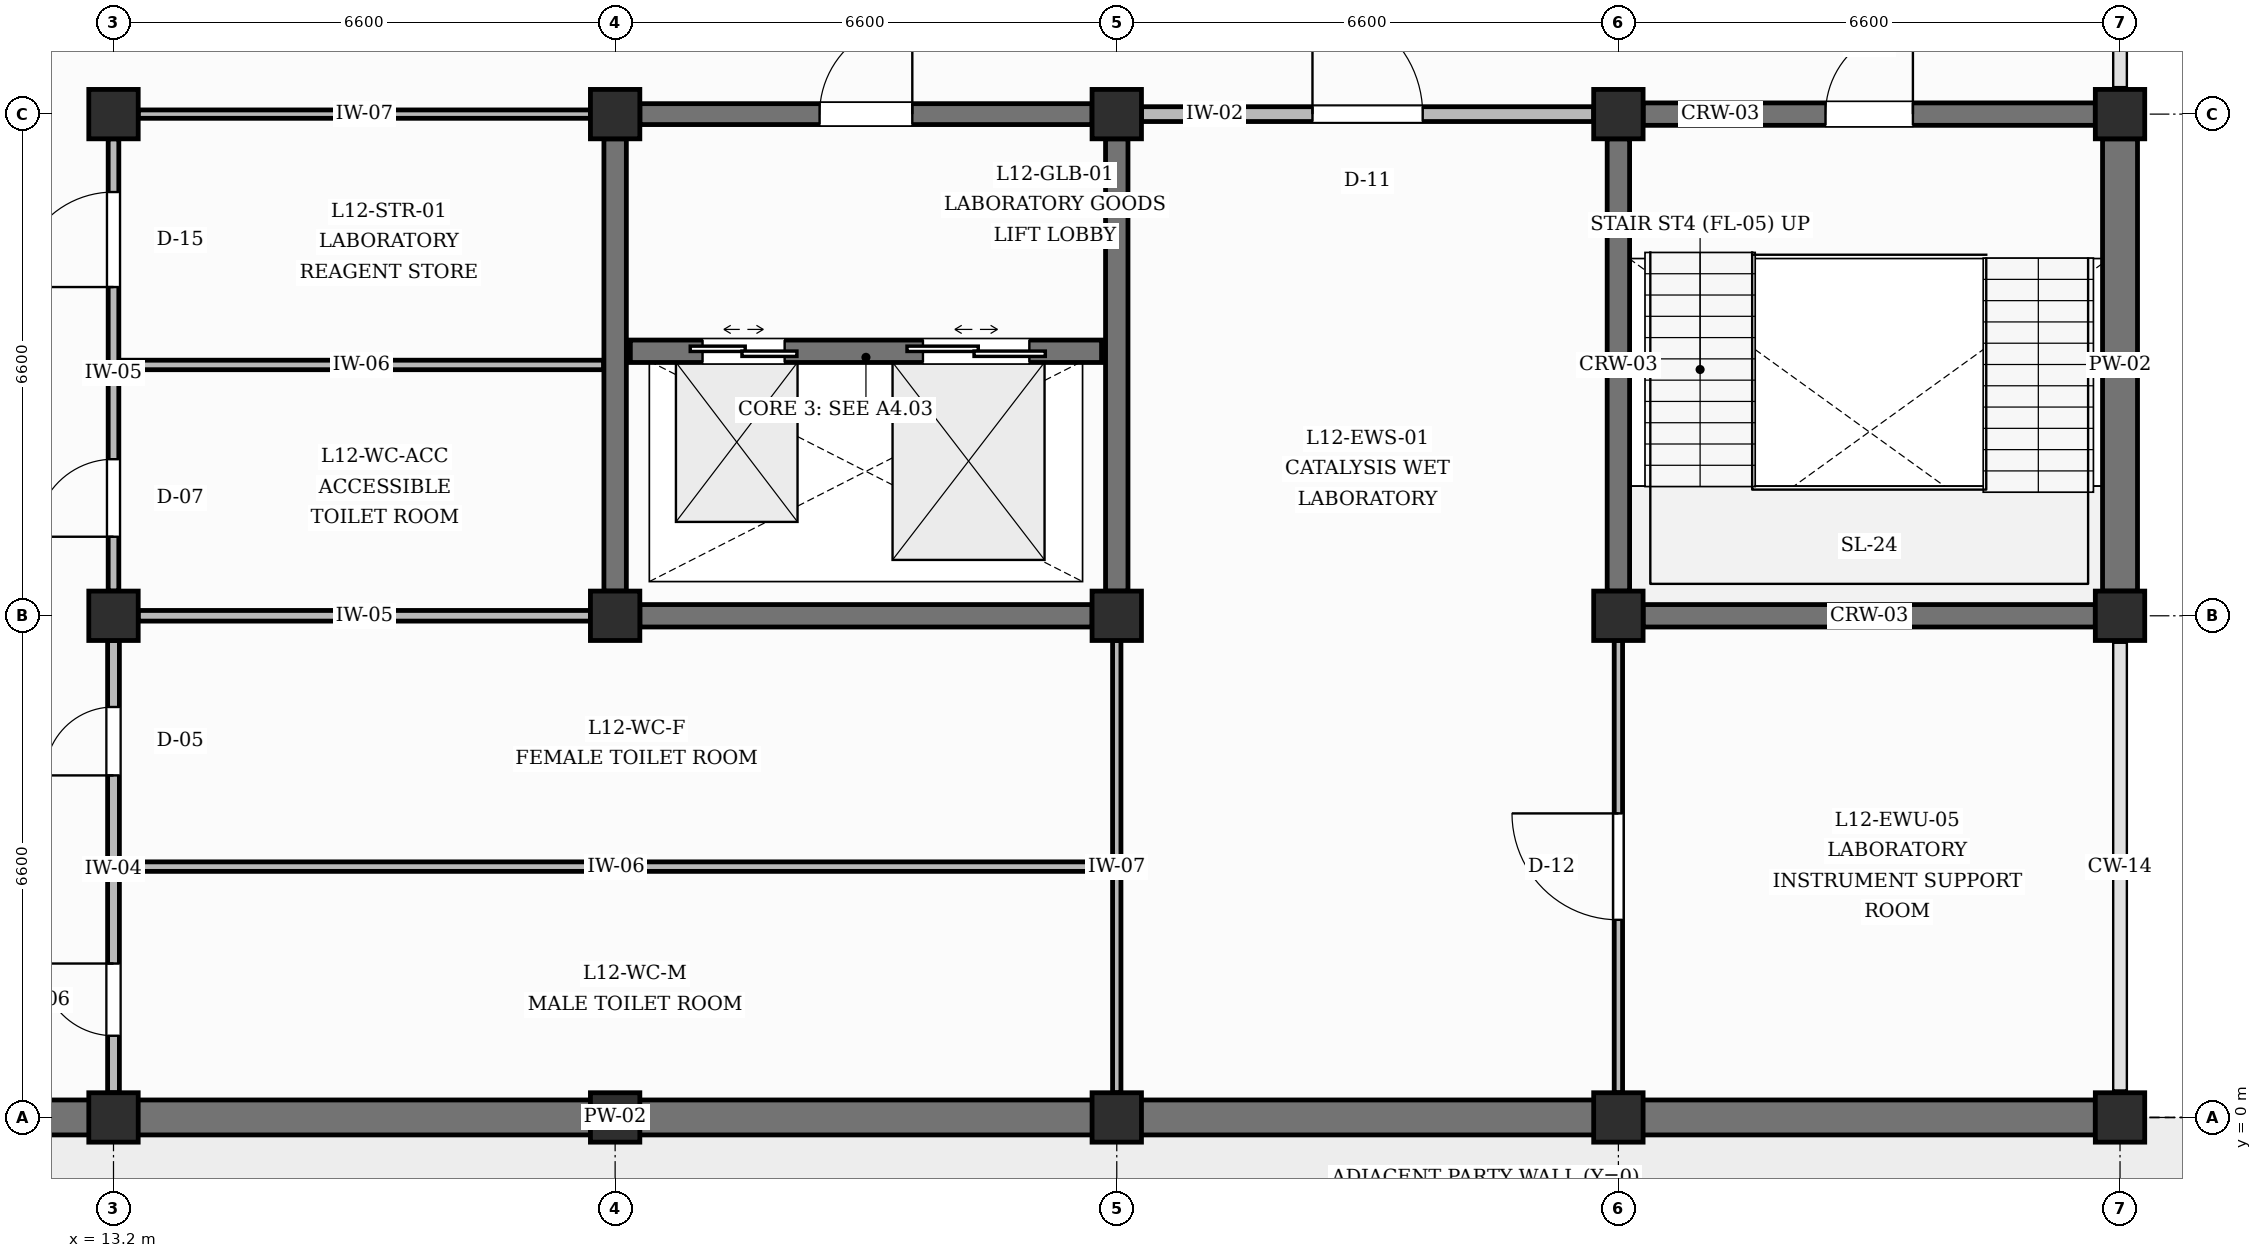
"""IFC4 building model, lengths in metres.
Left out: names, types, materials, properties, quantities, classifications, styles, units other than length and angle.
Written with IfcOpenShell. Run it as: python <this file> out.ifc"""

import sys

from ifc_helpers import new_model, si_unit, direction, frame, frame_2d, origin, origin_2d, place, context, subcontext, project, spatial, rectangle, extrude, element, fill, save


model = new_model("IFC4")
c1 = context("Model", 3, precision=1e-05, world=origin(), true_north=direction((0.0, 1.0)))
c2 = subcontext(c1, "Body", "Model", "MODEL_VIEW")
j1 = project(units=[si_unit("LENGTHUNIT", "METRE"), si_unit("PLANEANGLEUNIT", "RADIAN")], contexts=[c1])
p1 = place(None, origin())
s1 = spatial("IfcSite", under=j1, at=p1, CompositionType="ELEMENT")
p2 = place(p1, origin())
s2 = spatial("IfcBuilding", under=s1, at=p2, CompositionType="ELEMENT")
p3 = place(p2, frame((0.0, 0.0, 52.2)))
s3 = spatial("IfcBuildingStorey", under=s2, at=p3, CompositionType="ELEMENT", Elevation=52.2)
for number, where, z_axis, x_axis in (
    (1, (13.2, 0.0, 0.0), (0.0, 0.0, 1.0), (1.0, 0.0, 0.0)),
    (2, (13.2, 6.6, 0.0), (0.0, 0.0, 1.0), (1.0, 0.0, 0.0)),
    (3, (13.2, 13.2, 0.0), (0.0, 0.0, 1.0), (1.0, 0.0, 0.0)),
    (4, (19.8, 0.0, 0.0), (0.0, 0.0, 1.0), (1.0, 0.0, 0.0)),
    (5, (19.8, 6.6, 0.0), (0.0, 0.0, 1.0), (1.0, 0.0, 0.0)),
    (6, (19.8, 13.2, 0.0), (0.0, 0.0, 1.0), (1.0, 0.0, 0.0)),
    (7, (26.4, 0.0, 0.0), (0.0, 0.0, 1.0), (1.0, 0.0, 0.0)),
    (8, (26.4, 6.6, 0.0), (0.0, 0.0, 1.0), (1.0, 0.0, 0.0)),
    (9, (26.4, 13.2, 0.0), (0.0, 0.0, 1.0), (1.0, 0.0, 0.0)),
    (10, (33.0, 0.0, 0.0), (0.0, 0.0, 1.0), (1.0, 0.0, 0.0)),
    (11, (33.0, 6.6, 0.0), (0.0, 0.0, 1.0), (1.0, 0.0, 0.0)),
    (12, (33.0, 13.2, 0.0), (0.0, 0.0, 1.0), (1.0, 0.0, 0.0)),
    (13, (39.6, 0.0, 0.0), (0.0, 0.0, 1.0), (1.0, 0.0, 0.0)),
    (14, (39.6, 6.6, 0.0), (0.0, 0.0, 1.0), (1.0, 0.0, 0.0)),
    (15, (39.6, 13.2, 0.0), (0.0, 0.0, 1.0), (1.0, 0.0, 0.0)),
):
    element("IfcColumn", number, at=place(p3, frame(where, z_axis=z_axis, x_axis=x_axis)), inside=s3, PredefinedType="COLUMN", context=c2, shape_type="SweptSolid", body=[
        extrude(rectangle(XDim=0.65, YDim=0.65, at=origin_2d()), origin(), (0.0, 0.0, 1.0), 4.2),
    ])
p4 = place(p3, frame((6.925, 0.0, 0.0), z_axis=(0.0, 0.0, 1.0), x_axis=(1.0, 0.0, 0.0)))
e16 = element("IfcWall", 16, at=p4, inside=s3, PredefinedType="SOLIDWALL", context=c2, shape_type="SweptSolid", body=[
    extrude(rectangle(XDim=5.95, YDim=0.46, at=frame_2d((2.975, 0.0))), origin(), (0.0, 0.0, 1.0), 3.3),
])
p5 = place(p3, frame((13.525, 0.0, 0.0), z_axis=(0.0, 0.0, 1.0), x_axis=(1.0, 0.0, 0.0)))
e17 = element("IfcWall", 17, at=p5, inside=s3, PredefinedType="SOLIDWALL", context=c2, shape_type="SweptSolid", body=[
    extrude(rectangle(XDim=5.95, YDim=0.46, at=frame_2d((2.975, 0.0))), origin(), (0.0, 0.0, 1.0), 3.3),
])
for number, where, z_axis, x_axis in (
    (18, (20.125, 0.0, 0.0), (0.0, 0.0, 1.0), (1.0, 0.0, 0.0)),
    (19, (26.725, 0.0, 0.0), (0.0, 0.0, 1.0), (1.0, 0.0, 0.0)),
    (20, (33.325, 0.0, 0.0), (0.0, 0.0, 1.0), (1.0, 0.0, 0.0)),
    (21, (39.6, 6.925, 0.0), (0.0, 0.0, 1.0), (0.0, 1.0, 0.0)),
):
    element("IfcWall", number, at=place(p3, frame(where, z_axis=z_axis, x_axis=x_axis)), inside=s3, PredefinedType="SOLIDWALL", context=c2, shape_type="SweptSolid", body=[
        extrude(rectangle(XDim=5.95, YDim=0.46, at=frame_2d((2.975, 0.0))), origin(), (0.0, 0.0, 1.0), 3.3),
    ])
p6 = place(p3, frame((33.325, 6.6, 0.0), z_axis=(0.0, 0.0, 1.0), x_axis=(1.0, 0.0, 0.0)))
e22 = element("IfcWall", 22, at=p6, inside=s3, PredefinedType="SHEAR", context=c2, shape_type="SweptSolid", body=[
    extrude(rectangle(XDim=5.95, YDim=0.295, at=frame_2d((2.975, 0.0))), origin(), (0.0, 0.0, 1.0), 3.3),
])
p7 = place(p3, frame((33.325, 13.2, 0.0), z_axis=(0.0, 0.0, 1.0), x_axis=(1.0, 0.0, 0.0)))
e23 = element("IfcWall", 23, at=p7, inside=s3, PredefinedType="SHEAR", context=c2, shape_type="SweptSolid", body=[
    extrude(rectangle(XDim=5.95, YDim=0.295, at=frame_2d((2.975, 0.0))), origin(), (0.0, 0.0, 1.0), 3.3),
])
p8 = place(p7, frame((2.4, 0.0, 0.0)))
e24 = element("IfcOpeningElement", 24, at=p8, cuts=e23, PredefinedType="OPENING", context=c2, shape_type="SweptSolid", body=[
    extrude(rectangle(XDim=1.15, YDim=2.2, at=frame_2d((0.575, 1.1))), frame((0.0, 0.157, 0.0), z_axis=(0.0, -1.0, 0.0), x_axis=(1.0, 0.0, 0.0)), (0.0, 0.0, 1.0), 0.315),
])
for number, where, z_axis, x_axis in (
    (25, (33.0, 6.925, 0.0), (0.0, 0.0, 1.0), (0.0, 1.0, 0.0)),
    (26, (20.125, 6.6, 0.0), (0.0, 0.0, 1.0), (1.0, 0.0, 0.0)),
    (27, (19.8, 6.925, 0.0), (0.0, 0.0, 1.0), (0.0, 1.0, 0.0)),
    (28, (26.4, 6.925, 0.0), (0.0, 0.0, 1.0), (0.0, 1.0, 0.0)),
):
    element("IfcWall", number, at=place(p3, frame(where, z_axis=z_axis, x_axis=x_axis)), inside=s3, PredefinedType="SHEAR", context=c2, shape_type="SweptSolid", body=[
        extrude(rectangle(XDim=5.95, YDim=0.295, at=frame_2d((2.975, 0.0))), origin(), (0.0, 0.0, 1.0), 3.3),
    ])
p9 = place(p3, frame((20.125, 13.2, 0.0), z_axis=(0.0, 0.0, 1.0), x_axis=(1.0, 0.0, 0.0)))
e29 = element("IfcWall", 29, at=p9, inside=s3, PredefinedType="SHEAR", context=c2, shape_type="SweptSolid", body=[
    extrude(rectangle(XDim=5.95, YDim=0.275, at=frame_2d((2.975, 0.0))), origin(), (0.0, 0.0, 1.0), 3.3),
])
p10 = place(p9, frame((2.365, 0.0, 0.0)))
e30 = element("IfcOpeningElement", 30, at=p10, cuts=e29, PredefinedType="OPENING", context=c2, shape_type="SweptSolid", body=[
    extrude(rectangle(XDim=1.22, YDim=2.15, at=frame_2d((0.61, 1.075))), frame((0.0, 0.147, 0.0), z_axis=(0.0, -1.0, 0.0), x_axis=(1.0, 0.0, 0.0)), (0.0, 0.0, 1.0), 0.295),
])
p11 = place(p3, frame((20.0, 10.08, 0.0), z_axis=(0.0, 0.0, 1.0), x_axis=(1.0, 0.0, 0.0)))
e31 = element("IfcWall", 31, at=p11, inside=s3, PredefinedType="SHEAR", context=c2, shape_type="SweptSolid", body=[
    extrude(rectangle(XDim=6.2, YDim=0.295, at=frame_2d((3.1, 0.0))), origin(), (0.0, 0.0, 1.0), 3.9),
])
p12 = place(p11, frame((0.95, 0.0, 0.0)))
e32 = element("IfcOpeningElement", 32, at=p12, cuts=e31, PredefinedType="OPENING", context=c2, shape_type="SweptSolid", body=[
    extrude(rectangle(XDim=1.08, YDim=2.15, at=frame_2d((0.54, 1.075))), frame((0.0, 0.157, 0.0), z_axis=(0.0, -1.0, 0.0), x_axis=(1.0, 0.0, 0.0)), (0.0, 0.0, 1.0), 0.315),
])
p13 = place(p11, frame((3.85, 0.0, 0.0)))
e33 = element("IfcOpeningElement", 33, at=p13, cuts=e31, PredefinedType="OPENING", context=c2, shape_type="SweptSolid", body=[
    extrude(rectangle(XDim=1.4, YDim=2.35, at=frame_2d((0.7, 1.175))), frame((0.0, 0.157, 0.0), z_axis=(0.0, -1.0, 0.0), x_axis=(1.0, 0.0, 0.0)), (0.0, 0.0, 1.0), 0.315),
])
p14 = place(p3, frame((13.2, 0.325, 0.0), z_axis=(0.0, 0.0, 1.0), x_axis=(0.0, 1.0, 0.0)))
e34 = element("IfcWall", 34, at=p14, inside=s3, PredefinedType="PARTITIONING", context=c2, shape_type="SweptSolid", body=[
    extrude(rectangle(XDim=5.95, YDim=0.155, at=frame_2d((2.975, 0.0))), origin(), (0.0, 0.0, 1.0), 3.3),
])
p15 = place(p14, frame((0.75, 0.0, 0.0)))
e35 = element("IfcOpeningElement", 35, at=p15, cuts=e34, PredefinedType="OPENING", context=c2, shape_type="SweptSolid", body=[
    extrude(rectangle(XDim=0.95, YDim=2.1, at=frame_2d((0.475, 1.05))), frame((0.0, 0.087, 0.0), z_axis=(0.0, -1.0, 0.0), x_axis=(1.0, 0.0, 0.0)), (0.0, 0.0, 1.0), 0.175),
])
p16 = place(p14, frame((4.175, 0.0, 0.0)))
e36 = element("IfcOpeningElement", 36, at=p16, cuts=e34, PredefinedType="OPENING", context=c2, shape_type="SweptSolid", body=[
    extrude(rectangle(XDim=0.9, YDim=2.1, at=frame_2d((0.45, 1.05))), frame((0.0, 0.087, 0.0), z_axis=(0.0, -1.0, 0.0), x_axis=(1.0, 0.0, 0.0)), (0.0, 0.0, 1.0), 0.175),
])
p17 = place(p3, frame((26.4, 0.325, 0.0), z_axis=(0.0, 0.0, 1.0), x_axis=(0.0, 1.0, 0.0)))
e37 = element("IfcWall", 37, at=p17, inside=s3, PredefinedType="PARTITIONING", context=c2, shape_type="SweptSolid", body=[
    extrude(rectangle(XDim=5.95, YDim=0.11, at=frame_2d((2.975, 0.0))), origin(), (0.0, 0.0, 1.0), 3.3),
])
p18 = place(p3, frame((13.525, 6.6, 0.0), z_axis=(0.0, 0.0, 1.0), x_axis=(1.0, 0.0, 0.0)))
e38 = element("IfcWall", 38, at=p18, inside=s3, PredefinedType="PARTITIONING", context=c2, shape_type="SweptSolid", body=[
    extrude(rectangle(XDim=5.95, YDim=0.14, at=frame_2d((2.975, 0.0))), origin(), (0.0, 0.0, 1.0), 3.3),
])
p19 = place(p3, frame((13.2, 6.925, 0.0), z_axis=(0.0, 0.0, 1.0), x_axis=(0.0, 1.0, 0.0)))
e39 = element("IfcWall", 39, at=p19, inside=s3, PredefinedType="PARTITIONING", context=c2, shape_type="SweptSolid", body=[
    extrude(rectangle(XDim=5.95, YDim=0.14, at=frame_2d((2.975, 0.0))), origin(), (0.0, 0.0, 1.0), 3.3),
])
p20 = place(p19, frame((0.715, 0.0, 0.0)))
e40 = element("IfcOpeningElement", 40, at=p20, cuts=e39, PredefinedType="OPENING", context=c2, shape_type="SweptSolid", body=[
    extrude(rectangle(XDim=1.02, YDim=2.15, at=frame_2d((0.51, 1.075))), frame((0.0, 0.08, 0.0), z_axis=(0.0, -1.0, 0.0), x_axis=(1.0, 0.0, 0.0)), (0.0, 0.0, 1.0), 0.16),
])
p21 = place(p19, frame((4.0, 0.0, 0.0)))
e41 = element("IfcOpeningElement", 41, at=p21, cuts=e39, PredefinedType="OPENING", context=c2, shape_type="SweptSolid", body=[
    extrude(rectangle(XDim=1.25, YDim=2.25, at=frame_2d((0.625, 1.125))), frame((0.0, 0.08, 0.0), z_axis=(0.0, -1.0, 0.0), x_axis=(1.0, 0.0, 0.0)), (0.0, 0.0, 1.0), 0.16),
])
p22 = place(p3, frame((13.525, 13.2, 0.0), z_axis=(0.0, 0.0, 1.0), x_axis=(1.0, 0.0, 0.0)))
e42 = element("IfcWall", 42, at=p22, inside=s3, PredefinedType="PARTITIONING", context=c2, shape_type="SweptSolid", body=[
    extrude(rectangle(XDim=5.95, YDim=0.11, at=frame_2d((2.975, 0.0))), origin(), (0.0, 0.0, 1.0), 3.3),
])
p23 = place(p3, frame((33.0, 0.325, 0.0), z_axis=(0.0, 0.0, 1.0), x_axis=(0.0, 1.0, 0.0)))
e43 = element("IfcWall", 43, at=p23, inside=s3, PredefinedType="PARTITIONING", context=c2, shape_type="SweptSolid", body=[
    extrude(rectangle(XDim=5.95, YDim=0.11, at=frame_2d((2.975, 0.0))), origin(), (0.0, 0.0, 1.0), 3.3),
])
p24 = place(p23, frame((2.275, 0.0, 0.0)))
e44 = element("IfcOpeningElement", 44, at=p24, cuts=e43, PredefinedType="OPENING", context=c2, shape_type="SweptSolid", body=[
    extrude(rectangle(XDim=1.4, YDim=2.25, at=frame_2d((0.7, 1.125))), frame((0.0, 0.065, 0.0), z_axis=(0.0, -1.0, 0.0), x_axis=(1.0, 0.0, 0.0)), (0.0, 0.0, 1.0), 0.13),
])
p25 = place(p3, frame((26.725, 13.2, 0.0), z_axis=(0.0, 0.0, 1.0), x_axis=(1.0, 0.0, 0.0)))
e45 = element("IfcWall", 45, at=p25, inside=s3, PredefinedType="PARTITIONING", context=c2, shape_type="SweptSolid", body=[
    extrude(rectangle(XDim=5.95, YDim=0.195, at=frame_2d((2.975, 0.0))), origin(), (0.0, 0.0, 1.0), 3.3),
])
p26 = place(p25, frame((2.25, 0.0, 0.0)))
e46 = element("IfcOpeningElement", 46, at=p26, cuts=e45, PredefinedType="OPENING", context=c2, shape_type="SweptSolid", body=[
    extrude(rectangle(XDim=1.45, YDim=2.25, at=frame_2d((0.725, 1.125))), frame((0.0, 0.107, 0.0), z_axis=(0.0, -1.0, 0.0), x_axis=(1.0, 0.0, 0.0)), (0.0, 0.0, 1.0), 0.215),
])
p27 = place(p3, frame((13.282, 3.3, 0.0), z_axis=(0.0, 0.0, 1.0), x_axis=(1.0, 0.0, 0.0)))
e47 = element("IfcWall", 47, at=p27, inside=s3, PredefinedType="PARTITIONING", context=c2, shape_type="SweptSolid", body=[
    extrude(rectangle(XDim=13.058, YDim=0.125, at=frame_2d((6.529, 0.0))), origin(), (0.0, 0.0, 1.0), 3.9),
])
p28 = place(p3, frame((13.275, 9.9, 0.0), z_axis=(0.0, 0.0, 1.0), x_axis=(1.0, 0.0, 0.0)))
e48 = element("IfcWall", 48, at=p28, inside=s3, PredefinedType="PARTITIONING", context=c2, shape_type="SweptSolid", body=[
    extrude(rectangle(XDim=6.373, YDim=0.125, at=frame_2d((3.186, 0.0))), origin(), (0.0, 0.0, 1.0), 3.9),
])
p29 = place(p8, origin())
e49 = element("IfcDoor", 49, at=p29, inside=s3, OperationType="SINGLE_SWING_RIGHT", PredefinedType="DOOR", context=c2, shape_type="SweptSolid", body=[
    extrude(rectangle(XDim=1.15, YDim=2.2, at=frame_2d((0.575, 1.1))), frame((0.0, 0.025, 0.0), z_axis=(0.0, -1.0, 0.0), x_axis=(1.0, 0.0, 0.0)), (0.0, 0.0, 1.0), 0.05),
])
fill(e24, e49)
p30 = place(p12, origin())
e50 = element("IfcDoor", 50, at=p30, inside=s3, OperationType="DOUBLE_DOOR_SLIDING", PredefinedType="USERDEFINED", context=c2, shape_type="SweptSolid", body=[
    extrude(rectangle(XDim=1.08, YDim=2.15, at=frame_2d((0.54, 1.075))), frame((0.0, 0.025, 0.0), z_axis=(0.0, -1.0, 0.0), x_axis=(1.0, 0.0, 0.0)), (0.0, 0.0, 1.0), 0.05),
])
fill(e32, e50)
p31 = place(p13, origin())
e51 = element("IfcDoor", 51, at=p31, inside=s3, OperationType="DOUBLE_DOOR_SLIDING", PredefinedType="USERDEFINED", context=c2, shape_type="SweptSolid", body=[
    extrude(rectangle(XDim=1.4, YDim=2.35, at=frame_2d((0.7, 1.175))), frame((0.0, 0.025, 0.0), z_axis=(0.0, -1.0, 0.0), x_axis=(1.0, 0.0, 0.0)), (0.0, 0.0, 1.0), 0.05),
])
fill(e33, e51)
p32 = place(p10, origin())
e52 = element("IfcDoor", 52, at=p32, inside=s3, OperationType="SINGLE_SWING_RIGHT", PredefinedType="DOOR", context=c2, shape_type="SweptSolid", body=[
    extrude(rectangle(XDim=1.22, YDim=2.15, at=frame_2d((0.61, 1.075))), frame((0.0, 0.025, 0.0), z_axis=(0.0, -1.0, 0.0), x_axis=(1.0, 0.0, 0.0)), (0.0, 0.0, 1.0), 0.05),
])
fill(e30, e52)
p33 = place(p15, origin())
e53 = element("IfcDoor", 53, at=p33, inside=s3, OperationType="SINGLE_SWING_RIGHT", PredefinedType="DOOR", context=c2, shape_type="SweptSolid", body=[
    extrude(rectangle(XDim=0.95, YDim=2.1, at=frame_2d((0.475, 1.05))), frame((0.0, 0.025, 0.0), z_axis=(0.0, -1.0, 0.0), x_axis=(1.0, 0.0, 0.0)), (0.0, 0.0, 1.0), 0.05),
])
fill(e35, e53)
p34 = place(p16, origin())
e54 = element("IfcDoor", 54, at=p34, inside=s3, OperationType="SINGLE_SWING_LEFT", PredefinedType="DOOR", context=c2, shape_type="SweptSolid", body=[
    extrude(rectangle(XDim=0.9, YDim=2.1, at=frame_2d((0.45, 1.05))), frame((0.0, 0.025, 0.0), z_axis=(0.0, -1.0, 0.0), x_axis=(1.0, 0.0, 0.0)), (0.0, 0.0, 1.0), 0.05),
])
fill(e36, e54)
p35 = place(p20, origin())
e55 = element("IfcDoor", 55, at=p35, inside=s3, OperationType="SINGLE_SWING_LEFT", PredefinedType="DOOR", context=c2, shape_type="SweptSolid", body=[
    extrude(rectangle(XDim=1.02, YDim=2.15, at=frame_2d((0.51, 1.075))), frame((0.0, 0.025, 0.0), z_axis=(0.0, -1.0, 0.0), x_axis=(1.0, 0.0, 0.0)), (0.0, 0.0, 1.0), 0.05),
])
fill(e40, e55)
p36 = place(p21, origin())
e56 = element("IfcDoor", 56, at=p36, inside=s3, OperationType="SINGLE_SWING_LEFT", PredefinedType="DOOR", context=c2, shape_type="SweptSolid", body=[
    extrude(rectangle(XDim=1.25, YDim=2.25, at=frame_2d((0.625, 1.125))), frame((0.0, 0.025, 0.0), z_axis=(0.0, -1.0, 0.0), x_axis=(1.0, 0.0, 0.0)), (0.0, 0.0, 1.0), 0.05),
])
fill(e41, e56)
p37 = place(p26, origin())
e57 = element("IfcDoor", 57, at=p37, inside=s3, OperationType="SINGLE_SWING_LEFT", PredefinedType="DOOR", context=c2, shape_type="SweptSolid", body=[
    extrude(rectangle(XDim=1.45, YDim=2.25, at=frame_2d((0.725, 1.125))), frame((0.0, 0.025, 0.0), z_axis=(0.0, -1.0, 0.0), x_axis=(1.0, 0.0, 0.0)), (0.0, 0.0, 1.0), 0.05),
])
fill(e46, e57)
p38 = place(p24, origin())
e58 = element("IfcDoor", 58, at=p38, inside=s3, OperationType="SINGLE_SWING_RIGHT", PredefinedType="DOOR", context=c2, shape_type="SweptSolid", body=[
    extrude(rectangle(XDim=1.4, YDim=2.25, at=frame_2d((0.7, 1.125))), frame((0.0, 0.025, 0.0), z_axis=(0.0, -1.0, 0.0), x_axis=(1.0, 0.0, 0.0)), (0.0, 0.0, 1.0), 0.05),
])
fill(e44, e58)
save(model, sys.argv[1])
